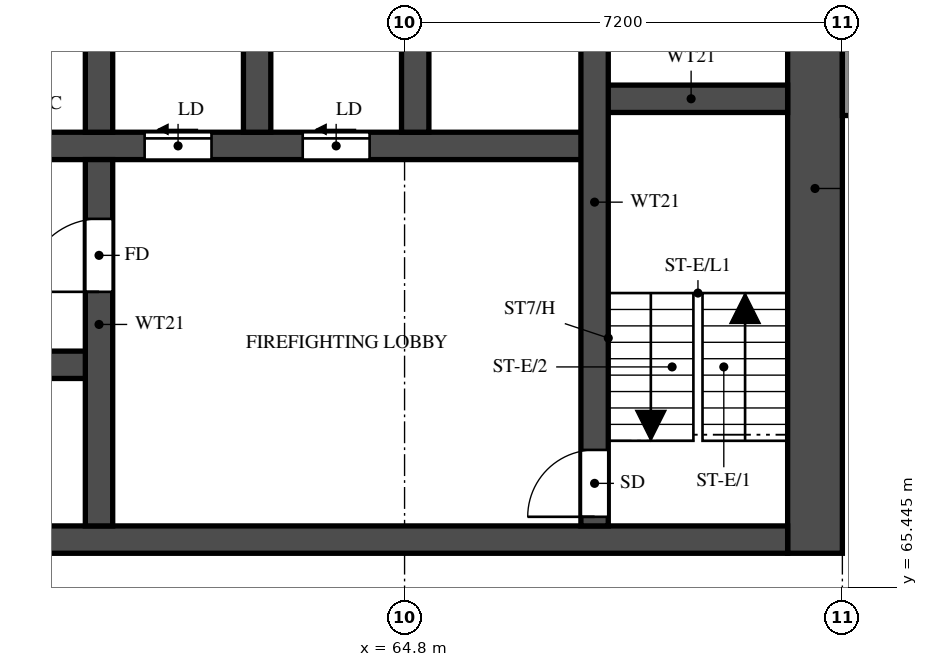
"""IFC4 building model, lengths in metres.
Left out: names, types, materials, properties, quantities, classifications, styles, units other than length and angle.
Written with IfcOpenShell. Run it as: python <this file> out.ifc"""

import sys

from ifc_helpers import new_model, si_unit, direction, frame, frame_2d, origin, place, context, subcontext, project, spatial, rectangle, extrude, element, fill, save


model = new_model("IFC4")
c1 = context("Model", 3, precision=1e-05, world=origin(), true_north=direction((0.0, 1.0)))
c2 = subcontext(c1, "Body", "Model", "MODEL_VIEW")
j1 = project(units=[si_unit("LENGTHUNIT", "METRE"), si_unit("PLANEANGLEUNIT", "RADIAN")], contexts=[c1])
p1 = place(None, origin())
s1 = spatial("IfcSite", under=j1, at=p1, CompositionType="ELEMENT")
p2 = place(p1, origin())
s2 = spatial("IfcBuilding", under=s1, at=p2, CompositionType="ELEMENT")
p3 = place(p2, frame((0.0, 0.0, 55.0)))
s3 = spatial("IfcBuildingStorey", under=s2, at=p3, CompositionType="ELEMENT", Elevation=55.0)
p4 = place(p3, frame((71.55, 66.0, 0.0), z_axis=(0.0, 0.0, 1.0), x_axis=(0.0, 1.0, 0.0)))
e1 = element("IfcWall", 1, at=p4, inside=s3, PredefinedType="SHEAR", context=c2, shape_type="SweptSolid", body=[
    extrude(rectangle(XDim=12.0, YDim=0.9, at=frame_2d((6.0, 0.0))), origin(), (0.0, 0.0, 1.0), 3.18),
])
p5 = place(p3, frame((29.7, 66.225, 0.0), z_axis=(0.0, 0.0, 1.0), x_axis=(1.0, 0.0, 0.0)))
e2 = element("IfcWall", 2, at=p5, inside=s3, PredefinedType="SHEAR", context=c2, shape_type="SweptSolid", body=[
    extrude(rectangle(XDim=41.4, YDim=0.45, at=frame_2d((20.7, 0.0))), origin(), (0.0, 0.0, 1.0), 3.18),
])
p6 = place(p5, frame((0.925, 0.0, 0.0)))
e3 = element("IfcOpeningElement", 3, at=p6, cuts=e2, PredefinedType="OPENING", context=c2, shape_type="SweptSolid", body=[
    extrude(rectangle(XDim=1.1, YDim=2.1, at=frame_2d((0.55, 1.05))), frame((0.0, 0.235, 0.0), z_axis=(0.0, -1.0, 0.0), x_axis=(1.0, 0.0, 0.0)), (0.0, 0.0, 1.0), 0.47),
])
p7 = place(p5, frame((3.738, 0.0, 0.0)))
e4 = element("IfcOpeningElement", 4, at=p7, cuts=e2, PredefinedType="OPENING", context=c2, shape_type="SweptSolid", body=[
    extrude(rectangle(XDim=1.8, YDim=2.1, at=frame_2d((0.9, 1.05))), frame((0.0, 0.235, 0.0), z_axis=(0.0, -1.0, 0.0), x_axis=(1.0, 0.0, 0.0)), (0.0, 0.0, 1.0), 0.47),
])
p8 = place(p3, frame((35.575, 69.1, 0.0), z_axis=(0.0, 0.0, 1.0), x_axis=(1.0, 0.0, 0.0)))
e5 = element("IfcWall", 5, at=p8, inside=s3, PredefinedType="SHEAR", context=c2, shape_type="SweptSolid", body=[
    extrude(rectangle(XDim=24.2, YDim=0.45, at=frame_2d((12.1, 0.0))), origin(), (0.0, 0.0, 1.0), 3.18),
])
p9 = place(p8, frame((1.05, 0.0, 0.0)))
e6 = element("IfcOpeningElement", 6, at=p9, cuts=e5, PredefinedType="OPENING", context=c2, shape_type="SweptSolid", body=[
    extrude(rectangle(XDim=1.1, YDim=2.1, at=frame_2d((0.55, 1.05))), frame((0.0, 0.235, 0.0), z_axis=(0.0, -1.0, 0.0), x_axis=(1.0, 0.0, 0.0)), (0.0, 0.0, 1.0), 0.47),
])
p10 = place(p8, frame((3.8, 0.0, 0.0)))
e7 = element("IfcOpeningElement", 7, at=p10, cuts=e5, PredefinedType="OPENING", context=c2, shape_type="SweptSolid", body=[
    extrude(rectangle(XDim=1.1, YDim=2.1, at=frame_2d((0.55, 1.05))), frame((0.0, 0.235, 0.0), z_axis=(0.0, -1.0, 0.0), x_axis=(1.0, 0.0, 0.0)), (0.0, 0.0, 1.0), 0.47),
])
p11 = place(p8, frame((6.55, 0.0, 0.0)))
e8 = element("IfcOpeningElement", 8, at=p11, cuts=e5, PredefinedType="OPENING", context=c2, shape_type="SweptSolid", body=[
    extrude(rectangle(XDim=1.1, YDim=2.1, at=frame_2d((0.55, 1.05))), frame((0.0, 0.235, 0.0), z_axis=(0.0, -1.0, 0.0), x_axis=(1.0, 0.0, 0.0)), (0.0, 0.0, 1.0), 0.47),
])
p12 = place(p8, frame((9.3, 0.0, 0.0)))
e9 = element("IfcOpeningElement", 9, at=p12, cuts=e5, PredefinedType="OPENING", context=c2, shape_type="SweptSolid", body=[
    extrude(rectangle(XDim=1.1, YDim=2.1, at=frame_2d((0.55, 1.05))), frame((0.0, 0.235, 0.0), z_axis=(0.0, -1.0, 0.0), x_axis=(1.0, 0.0, 0.0)), (0.0, 0.0, 1.0), 0.47),
])
p13 = place(p8, frame((12.05, 0.0, 0.0)))
e10 = element("IfcOpeningElement", 10, at=p13, cuts=e5, PredefinedType="OPENING", context=c2, shape_type="SweptSolid", body=[
    extrude(rectangle(XDim=1.1, YDim=2.1, at=frame_2d((0.55, 1.05))), frame((0.0, 0.235, 0.0), z_axis=(0.0, -1.0, 0.0), x_axis=(1.0, 0.0, 0.0)), (0.0, 0.0, 1.0), 0.47),
])
p14 = place(p8, frame((14.8, 0.0, 0.0)))
e11 = element("IfcOpeningElement", 11, at=p14, cuts=e5, PredefinedType="OPENING", context=c2, shape_type="SweptSolid", body=[
    extrude(rectangle(XDim=1.1, YDim=2.1, at=frame_2d((0.55, 1.05))), frame((0.0, 0.235, 0.0), z_axis=(0.0, -1.0, 0.0), x_axis=(1.0, 0.0, 0.0)), (0.0, 0.0, 1.0), 0.47),
])
p15 = place(p3, frame((32.875, 72.7, 0.0), z_axis=(0.0, 0.0, 1.0), x_axis=(1.0, 0.0, 0.0)))
e12 = element("IfcWall", 12, at=p15, inside=s3, PredefinedType="SHEAR", context=c2, shape_type="SweptSolid", body=[
    extrude(rectangle(XDim=35.05, YDim=0.45, at=frame_2d((17.525, 0.0))), origin(), (0.0, 0.0, 1.0), 3.18),
])
p16 = place(p15, frame((19.8, 0.0, 0.0)))
e13 = element("IfcOpeningElement", 13, at=p16, cuts=e12, PredefinedType="OPENING", context=c2, shape_type="SweptSolid", body=[
    extrude(rectangle(XDim=1.1, YDim=2.1, at=frame_2d((0.55, 1.05))), frame((0.0, 0.235, 0.0), z_axis=(0.0, -1.0, 0.0), x_axis=(1.0, 0.0, 0.0)), (0.0, 0.0, 1.0), 0.47),
])
p17 = place(p15, frame((27.65, 0.0, 0.0)))
e14 = element("IfcOpeningElement", 14, at=p17, cuts=e12, PredefinedType="OPENING", context=c2, shape_type="SweptSolid", body=[
    extrude(rectangle(XDim=1.1, YDim=2.1, at=frame_2d((0.55, 1.05))), frame((0.0, 0.235, 0.0), z_axis=(0.0, -1.0, 0.0), x_axis=(1.0, 0.0, 0.0)), (0.0, 0.0, 1.0), 0.47),
])
p18 = place(p15, frame((30.25, 0.0, 0.0)))
e15 = element("IfcOpeningElement", 15, at=p18, cuts=e12, PredefinedType="OPENING", context=c2, shape_type="SweptSolid", body=[
    extrude(rectangle(XDim=1.1, YDim=2.1, at=frame_2d((0.55, 1.05))), frame((0.0, 0.235, 0.0), z_axis=(0.0, -1.0, 0.0), x_axis=(1.0, 0.0, 0.0)), (0.0, 0.0, 1.0), 0.47),
])
p19 = place(p15, frame((3.75, 0.0, 0.0)))
e16 = element("IfcOpeningElement", 16, at=p19, cuts=e12, PredefinedType="OPENING", context=c2, shape_type="SweptSolid", body=[
    extrude(rectangle(XDim=1.1, YDim=2.1, at=frame_2d((0.55, 1.05))), frame((0.0, 0.235, 0.0), z_axis=(0.0, -1.0, 0.0), x_axis=(1.0, 0.0, 0.0)), (0.0, 0.0, 1.0), 0.47),
])
p20 = place(p15, frame((6.5, 0.0, 0.0)))
e17 = element("IfcOpeningElement", 17, at=p20, cuts=e12, PredefinedType="OPENING", context=c2, shape_type="SweptSolid", body=[
    extrude(rectangle(XDim=1.1, YDim=2.1, at=frame_2d((0.55, 1.05))), frame((0.0, 0.235, 0.0), z_axis=(0.0, -1.0, 0.0), x_axis=(1.0, 0.0, 0.0)), (0.0, 0.0, 1.0), 0.47),
])
p21 = place(p15, frame((9.25, 0.0, 0.0)))
e18 = element("IfcOpeningElement", 18, at=p21, cuts=e12, PredefinedType="OPENING", context=c2, shape_type="SweptSolid", body=[
    extrude(rectangle(XDim=1.1, YDim=2.1, at=frame_2d((0.55, 1.05))), frame((0.0, 0.235, 0.0), z_axis=(0.0, -1.0, 0.0), x_axis=(1.0, 0.0, 0.0)), (0.0, 0.0, 1.0), 0.47),
])
p22 = place(p15, frame((12.0, 0.0, 0.0)))
e19 = element("IfcOpeningElement", 19, at=p22, cuts=e12, PredefinedType="OPENING", context=c2, shape_type="SweptSolid", body=[
    extrude(rectangle(XDim=1.1, YDim=2.1, at=frame_2d((0.55, 1.05))), frame((0.0, 0.235, 0.0), z_axis=(0.0, -1.0, 0.0), x_axis=(1.0, 0.0, 0.0)), (0.0, 0.0, 1.0), 0.47),
])
p23 = place(p15, frame((14.75, 0.0, 0.0)))
e20 = element("IfcOpeningElement", 20, at=p23, cuts=e12, PredefinedType="OPENING", context=c2, shape_type="SweptSolid", body=[
    extrude(rectangle(XDim=1.1, YDim=2.1, at=frame_2d((0.55, 1.05))), frame((0.0, 0.235, 0.0), z_axis=(0.0, -1.0, 0.0), x_axis=(1.0, 0.0, 0.0)), (0.0, 0.0, 1.0), 0.47),
])
p24 = place(p15, frame((17.5, 0.0, 0.0)))
e21 = element("IfcOpeningElement", 21, at=p24, cuts=e12, PredefinedType="OPENING", context=c2, shape_type="SweptSolid", body=[
    extrude(rectangle(XDim=1.1, YDim=2.1, at=frame_2d((0.55, 1.05))), frame((0.0, 0.235, 0.0), z_axis=(0.0, -1.0, 0.0), x_axis=(1.0, 0.0, 0.0)), (0.0, 0.0, 1.0), 0.47),
])
p25 = place(p15, frame((0.913, 0.0, 0.0)))
e22 = element("IfcOpeningElement", 22, at=p25, cuts=e12, PredefinedType="OPENING", context=c2, shape_type="SweptSolid", body=[
    extrude(rectangle(XDim=1.1, YDim=2.1, at=frame_2d((0.55, 1.05))), frame((0.0, 0.235, 0.0), z_axis=(0.0, -1.0, 0.0), x_axis=(1.0, 0.0, 0.0)), (0.0, 0.0, 1.0), 0.47),
])
p26 = place(p3, frame((67.925, 73.475, 0.0), z_axis=(0.0, 0.0, 1.0), x_axis=(1.0, 0.0, 0.0)))
e23 = element("IfcWall", 23, at=p26, inside=s3, PredefinedType="SHEAR", context=c2, shape_type="SweptSolid", body=[
    extrude(rectangle(XDim=3.175, YDim=0.45, at=frame_2d((1.587, 0.0))), origin(), (0.0, 0.0, 1.0), 3.18),
])
p27 = place(p3, frame((67.925, 66.45, 0.0), z_axis=(0.0, 0.0, 1.0), x_axis=(0.0, 1.0, 0.0)))
e24 = element("IfcWall", 24, at=p27, inside=s3, PredefinedType="SHEAR", context=c2, shape_type="SweptSolid", body=[
    extrude(rectangle(XDim=10.65, YDim=0.45, at=frame_2d((5.325, 0.0))), origin(), (0.0, 0.0, 1.0), 3.18),
])
p28 = place(p27, frame((0.15, 0.0, 0.0)))
e25 = element("IfcOpeningElement", 25, at=p28, cuts=e24, PredefinedType="OPENING", context=c2, shape_type="SweptSolid", body=[
    extrude(rectangle(XDim=1.1, YDim=2.1, at=frame_2d((0.55, 1.05))), frame((0.0, 0.235, 0.0), z_axis=(0.0, -1.0, 0.0), x_axis=(1.0, 0.0, 0.0)), (0.0, 0.0, 1.0), 0.47),
])
p29 = place(p3, frame((59.775, 66.45, 0.0), z_axis=(0.0, 0.0, 1.0), x_axis=(0.0, 1.0, 0.0)))
e26 = element("IfcWall", 26, at=p29, inside=s3, PredefinedType="SHEAR", context=c2, shape_type="SweptSolid", body=[
    extrude(rectangle(XDim=6.025, YDim=0.45, at=frame_2d((3.013, 0.0))), origin(), (0.0, 0.0, 1.0), 3.18),
])
p30 = place(p29, frame((3.85, 0.0, 0.0)))
e27 = element("IfcOpeningElement", 27, at=p30, cuts=e26, PredefinedType="OPENING", context=c2, shape_type="SweptSolid", body=[
    extrude(rectangle(XDim=1.2, YDim=2.1, at=frame_2d((0.6, 1.05))), frame((0.0, 0.235, 0.0), z_axis=(0.0, -1.0, 0.0), x_axis=(1.0, 0.0, 0.0)), (0.0, 0.0, 1.0), 0.47),
])
for number, where, z_axis, x_axis in (
    (28, (59.775, 72.925, 0.0), (0.0, 0.0, 1.0), (0.0, 1.0, 0.0)),
    (29, (62.375, 72.925, 0.0), (0.0, 0.0, 1.0), (0.0, 1.0, 0.0)),
    (30, (64.975, 72.925, 0.0), (0.0, 0.0, 1.0), (0.0, 1.0, 0.0)),
):
    element("IfcWall", number, at=place(p3, frame(where, z_axis=z_axis, x_axis=x_axis)), inside=s3, PredefinedType="SHEAR", context=c2, shape_type="SweptSolid", body=[
        extrude(rectangle(XDim=2.95, YDim=0.45, at=frame_2d((1.475, 0.0))), origin(), (0.0, 0.0, 1.0), 3.18),
    ])
p31 = place(p3, frame((72.1, 73.2, 0.0), z_axis=(0.0, 0.0, 1.0), x_axis=(0.0, 1.0, 0.0)))
e31 = element("IfcWall", 31, at=p31, inside=s3, PredefinedType="SOLIDWALL", context=c2, shape_type="SweptSolid", body=[
    extrude(rectangle(XDim=4.8, YDim=0.2, at=frame_2d((2.4, 0.0))), origin(), (0.0, 0.0, 1.0), 3.18),
])
p32 = place(p28, origin())
e32 = element("IfcDoor", 32, at=p32, inside=s3, OperationType="SINGLE_SWING_LEFT", PredefinedType="DOOR", context=c2, shape_type="SweptSolid", body=[
    extrude(rectangle(XDim=1.1, YDim=2.1, at=frame_2d((0.55, 1.05))), frame((0.0, 0.025, 0.0), z_axis=(0.0, -1.0, 0.0), x_axis=(1.0, 0.0, 0.0)), (0.0, 0.0, 1.0), 0.05),
])
fill(e25, e32)
p33 = place(p30, origin())
e33 = element("IfcDoor", 33, at=p33, inside=s3, OperationType="SINGLE_SWING_RIGHT", PredefinedType="DOOR", context=c2, shape_type="SweptSolid", body=[
    extrude(rectangle(XDim=1.2, YDim=2.1, at=frame_2d((0.6, 1.05))), frame((0.0, 0.025, 0.0), z_axis=(0.0, -1.0, 0.0), x_axis=(1.0, 0.0, 0.0)), (0.0, 0.0, 1.0), 0.05),
])
fill(e27, e33)
p34 = place(p17, origin())
e34 = element("IfcDoor", 34, at=p34, inside=s3, OperationType="SLIDING_TO_LEFT", PredefinedType="DOOR", context=c2, shape_type="SweptSolid", body=[
    extrude(rectangle(XDim=1.1, YDim=2.1, at=frame_2d((0.55, 1.05))), frame((0.0, 0.025, 0.0), z_axis=(0.0, -1.0, 0.0), x_axis=(1.0, 0.0, 0.0)), (0.0, 0.0, 1.0), 0.05),
])
fill(e14, e34)
p35 = place(p18, origin())
e35 = element("IfcDoor", 35, at=p35, inside=s3, OperationType="SLIDING_TO_LEFT", PredefinedType="DOOR", context=c2, shape_type="SweptSolid", body=[
    extrude(rectangle(XDim=1.1, YDim=2.1, at=frame_2d((0.55, 1.05))), frame((0.0, 0.025, 0.0), z_axis=(0.0, -1.0, 0.0), x_axis=(1.0, 0.0, 0.0)), (0.0, 0.0, 1.0), 0.05),
])
fill(e15, e35)
save(model, sys.argv[1])
